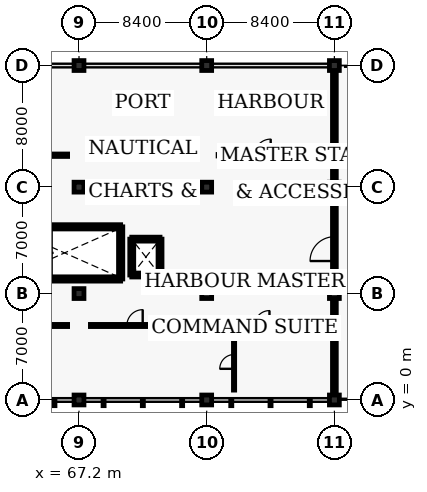
"""IFC4 building model, lengths in metres.
Left out: names, types, materials, properties, quantities, classifications, styles, units other than length and angle.
Written with IfcOpenShell. Run it as: python <this file> out.ifc"""

import sys

from ifc_helpers import new_model, si_unit, direction, frame, frame_2d, origin, origin_2d, place, context, subcontext, project, spatial, rectangle, extrude, element, fill, save


model = new_model("IFC4")
c1 = context("Model", 3, precision=1e-05, world=origin(), true_north=direction((0.0, 1.0)))
c2 = subcontext(c1, "Body", "Model", "MODEL_VIEW")
j1 = project(units=[si_unit("LENGTHUNIT", "METRE"), si_unit("PLANEANGLEUNIT", "RADIAN")], contexts=[c1])
p1 = place(None, origin())
s1 = spatial("IfcSite", under=j1, at=p1, CompositionType="ELEMENT")
p2 = place(p1, origin())
s2 = spatial("IfcBuilding", under=s1, at=p2, CompositionType="ELEMENT")
p3 = place(p2, frame((0.0, 0.0, 13.12)))
s3 = spatial("IfcBuildingStorey", under=s2, at=p3, CompositionType="ELEMENT", Elevation=13.12)
for number, where, z_axis, x_axis in (
    (1, (67.2, 0.0, 0.0), (0.0, 0.0, 1.0), (1.0, 0.0, 0.0)),
    (2, (67.2, 7.0, 0.0), (0.0, 0.0, 1.0), (1.0, 0.0, 0.0)),
    (3, (67.2, 14.0, 0.0), (0.0, 0.0, 1.0), (1.0, 0.0, 0.0)),
    (4, (67.2, 22.0, 0.0), (0.0, 0.0, 1.0), (1.0, 0.0, 0.0)),
    (5, (75.6, 0.0, 0.0), (0.0, 0.0, 1.0), (1.0, 0.0, 0.0)),
    (6, (75.6, 7.0, 0.0), (0.0, 0.0, 1.0), (1.0, 0.0, 0.0)),
    (7, (75.6, 14.0, 0.0), (0.0, 0.0, 1.0), (1.0, 0.0, 0.0)),
    (8, (75.6, 22.0, 0.0), (0.0, 0.0, 1.0), (1.0, 0.0, 0.0)),
    (9, (84.0, 0.0, 0.0), (0.0, 0.0, 1.0), (1.0, 0.0, 0.0)),
    (10, (84.0, 7.0, 0.0), (0.0, 0.0, 1.0), (1.0, 0.0, 0.0)),
    (11, (84.0, 14.0, 0.0), (0.0, 0.0, 1.0), (1.0, 0.0, 0.0)),
    (12, (84.0, 22.0, 0.0), (0.0, 0.0, 1.0), (1.0, 0.0, 0.0)),
):
    element("IfcColumn", number, at=place(p3, frame(where, z_axis=z_axis, x_axis=x_axis)), inside=s3, PredefinedType="COLUMN", context=c2, shape_type="SweptSolid", body=[
        extrude(rectangle(XDim=0.65, YDim=0.65, at=origin_2d()), origin(), (0.0, 0.0, 1.0), 3.2),
    ])
p4 = place(p3, frame((84.0, 0.325, 0.0), z_axis=(0.0, 0.0, 1.0), x_axis=(0.0, 1.0, 0.0)))
e13 = element("IfcWall", 13, at=p4, inside=s3, PredefinedType="SOLIDWALL", context=c2, shape_type="SweptSolid", body=[
    extrude(rectangle(XDim=6.35, YDim=0.25, at=frame_2d((3.175, 0.0))), origin(), (0.0, 0.0, 1.0), 2.275),
])
p5 = place(p3, frame((84.0, 7.325, 0.0), z_axis=(0.0, 0.0, 1.0), x_axis=(0.0, 1.0, 0.0)))
e14 = element("IfcWall", 14, at=p5, inside=s3, PredefinedType="SOLIDWALL", context=c2, shape_type="SweptSolid", body=[
    extrude(rectangle(XDim=6.35, YDim=0.25, at=frame_2d((3.175, 0.0))), origin(), (0.0, 0.0, 1.0), 2.275),
])
p6 = place(p5, frame((1.815, 0.0, 0.0)))
e15 = element("IfcOpeningElement", 15, at=p6, cuts=e14, PredefinedType="OPENING", context=c2, shape_type="SweptSolid", body=[
    extrude(rectangle(XDim=1.6, YDim=2.1, at=frame_2d((0.8, 1.05))), frame((0.0, 0.135, 0.0), z_axis=(0.0, -1.0, 0.0), x_axis=(1.0, 0.0, 0.0)), (0.0, 0.0, 1.0), 0.27),
])
p7 = place(p3, frame((84.0, 14.325, 0.0), z_axis=(0.0, 0.0, 1.0), x_axis=(0.0, 1.0, 0.0)))
e16 = element("IfcWall", 16, at=p7, inside=s3, PredefinedType="SOLIDWALL", context=c2, shape_type="SweptSolid", body=[
    extrude(rectangle(XDim=7.35, YDim=0.25, at=frame_2d((3.675, 0.0))), origin(), (0.0, 0.0, 1.0), 2.275),
])
for number, where, z_axis, x_axis in (
    (17, (61.06, 7.96, 0.0), (0.0, 0.0, 1.0), (1.0, 0.0, 0.0)),
    (18, (61.06, 11.39, 0.0), (0.0, 0.0, 1.0), (1.0, 0.0, 0.0)),
):
    element("IfcWall", number, at=place(p3, frame(where, z_axis=z_axis, x_axis=x_axis)), inside=s3, PredefinedType="SHEAR", context=c2, shape_type="SweptSolid", body=[
        extrude(rectangle(XDim=8.88, YDim=0.28, at=frame_2d((4.44, 0.0))), origin(), (0.0, 0.0, 1.0), 3.2),
    ])
p8 = place(p3, frame((69.94, 7.96, 0.0), z_axis=(0.0, 0.0, 1.0), x_axis=(0.0, 1.0, 0.0)))
e19 = element("IfcWall", 19, at=p8, inside=s3, PredefinedType="SHEAR", context=c2, shape_type="SweptSolid", body=[
    extrude(rectangle(XDim=3.43, YDim=0.28, at=frame_2d((1.715, 0.0))), origin(), (0.0, 0.0, 1.0), 3.2),
])
p9 = place(p3, frame((70.67, 8.22, 0.0), z_axis=(0.0, 0.0, 1.0), x_axis=(1.0, 0.0, 0.0)))
e20 = element("IfcWall", 20, at=p9, inside=s3, PredefinedType="SHEAR", context=c2, shape_type="SweptSolid", body=[
    extrude(rectangle(XDim=1.86, YDim=0.26, at=frame_2d((0.93, 0.0))), origin(), (0.0, 0.0, 1.0), 3.2),
])
for number, where, z_axis, x_axis in (
    (21, (72.53, 8.22, 0.0), (0.0, 0.0, 1.0), (0.0, 1.0, 0.0)),
    (22, (70.67, 10.58, 0.0), (0.0, 0.0, 1.0), (0.0, -1.0, 0.0)),
):
    element("IfcWall", number, at=place(p3, frame(where, z_axis=z_axis, x_axis=x_axis)), inside=s3, PredefinedType="SHEAR", context=c2, shape_type="SweptSolid", body=[
        extrude(rectangle(XDim=2.36, YDim=0.26, at=frame_2d((1.18, 0.0))), origin(), (0.0, 0.0, 1.0), 3.2),
    ])
p10 = place(p3, frame((70.67, 10.58, 0.0), z_axis=(0.0, 0.0, 1.0), x_axis=(1.0, 0.0, 0.0)))
e23 = element("IfcWall", 23, at=p10, inside=s3, PredefinedType="SHEAR", context=c2, shape_type="SweptSolid", body=[
    extrude(rectangle(XDim=1.86, YDim=0.26, at=frame_2d((0.93, 0.0))), origin(), (0.0, 0.0, 1.0), 3.2),
])
p11 = place(p10, frame((0.36, 0.0, 0.0)))
e24 = element("IfcOpeningElement", 24, at=p11, cuts=e23, PredefinedType="OPENING", context=c2, shape_type="SweptSolid", body=[
    extrude(rectangle(XDim=1.14, YDim=2.14, at=frame_2d((0.57, 1.07))), frame((0.0, 0.14, 0.0), z_axis=(0.0, -1.0, 0.0), x_axis=(1.0, 0.0, 0.0)), (0.0, 0.0, 1.0), 0.28),
])
p12 = place(p3, frame((59.55, 4.9, 0.0), z_axis=(0.0, 0.0, 1.0), x_axis=(1.0, 0.0, 0.0)))
e25 = element("IfcWall", 25, at=p12, inside=s3, PredefinedType="PARTITIONING", context=c2, shape_type="SweptSolid", body=[
    extrude(rectangle(XDim=6.9, YDim=0.14, at=frame_2d((3.45, 0.0))), origin(), (0.0, 0.0, 1.0), 2.475),
])
p13 = place(p12, frame((2.4, 0.0, 0.0)))
e26 = element("IfcOpeningElement", 26, at=p13, cuts=e25, PredefinedType="OPENING", context=c2, shape_type="SweptSolid", body=[
    extrude(rectangle(XDim=0.98, YDim=2.12, at=frame_2d((0.49, 1.06))), frame((0.0, 0.08, 0.0), z_axis=(0.0, -1.0, 0.0), x_axis=(1.0, 0.0, 0.0)), (0.0, 0.0, 1.0), 0.16),
])
p14 = place(p3, frame((59.55, 16.1, 0.0), z_axis=(0.0, 0.0, 1.0), x_axis=(1.0, 0.0, 0.0)))
e27 = element("IfcWall", 27, at=p14, inside=s3, PredefinedType="PARTITIONING", context=c2, shape_type="SweptSolid", body=[
    extrude(rectangle(XDim=6.9, YDim=0.16, at=frame_2d((3.45, 0.0))), origin(), (0.0, 0.0, 1.0), 2.475),
])
p15 = place(p14, frame((2.4, 0.0, 0.0)))
e28 = element("IfcOpeningElement", 28, at=p15, cuts=e27, PredefinedType="OPENING", context=c2, shape_type="SweptSolid", body=[
    extrude(rectangle(XDim=1.04, YDim=2.14, at=frame_2d((0.52, 1.07))), frame((0.0, 0.09, 0.0), z_axis=(0.0, -1.0, 0.0), x_axis=(1.0, 0.0, 0.0)), (0.0, 0.0, 1.0), 0.18),
])
p16 = place(p3, frame((67.95, 4.9, 0.0), z_axis=(0.0, 0.0, 1.0), x_axis=(1.0, 0.0, 0.0)))
e29 = element("IfcWall", 29, at=p16, inside=s3, PredefinedType="PARTITIONING", context=c2, shape_type="SweptSolid", body=[
    extrude(rectangle(XDim=6.9, YDim=0.14, at=frame_2d((3.45, 0.0))), origin(), (0.0, 0.0, 1.0), 2.475),
])
p17 = place(p16, frame((2.4, 0.0, 0.0)))
e30 = element("IfcOpeningElement", 30, at=p17, cuts=e29, PredefinedType="OPENING", context=c2, shape_type="SweptSolid", body=[
    extrude(rectangle(XDim=1.04, YDim=2.14, at=frame_2d((0.52, 1.07))), frame((0.0, 0.08, 0.0), z_axis=(0.0, -1.0, 0.0), x_axis=(1.0, 0.0, 0.0)), (0.0, 0.0, 1.0), 0.16),
])
p18 = place(p3, frame((67.95, 16.1, 0.0), z_axis=(0.0, 0.0, 1.0), x_axis=(1.0, 0.0, 0.0)))
e31 = element("IfcWall", 31, at=p18, inside=s3, PredefinedType="PARTITIONING", context=c2, shape_type="SweptSolid", body=[
    extrude(rectangle(XDim=6.9, YDim=0.16, at=frame_2d((3.45, 0.0))), origin(), (0.0, 0.0, 1.0), 2.475),
])
p19 = place(p18, frame((2.4, 0.0, 0.0)))
e32 = element("IfcOpeningElement", 32, at=p19, cuts=e31, PredefinedType="OPENING", context=c2, shape_type="SweptSolid", body=[
    extrude(rectangle(XDim=1.04, YDim=2.14, at=frame_2d((0.52, 1.07))), frame((0.0, 0.09, 0.0), z_axis=(0.0, -1.0, 0.0), x_axis=(1.0, 0.0, 0.0)), (0.0, 0.0, 1.0), 0.18),
])
p20 = place(p3, frame((76.35, 4.9, 0.0), z_axis=(0.0, 0.0, 1.0), x_axis=(1.0, 0.0, 0.0)))
e33 = element("IfcWall", 33, at=p20, inside=s3, PredefinedType="PARTITIONING", context=c2, shape_type="SweptSolid", body=[
    extrude(rectangle(XDim=6.9, YDim=0.14, at=frame_2d((3.45, 0.0))), origin(), (0.0, 0.0, 1.0), 2.475),
])
p21 = place(p20, frame((2.4, 0.0, 0.0)))
e34 = element("IfcOpeningElement", 34, at=p21, cuts=e33, PredefinedType="OPENING", context=c2, shape_type="SweptSolid", body=[
    extrude(rectangle(XDim=0.98, YDim=2.12, at=frame_2d((0.49, 1.06))), frame((0.0, 0.08, 0.0), z_axis=(0.0, -1.0, 0.0), x_axis=(1.0, 0.0, 0.0)), (0.0, 0.0, 1.0), 0.16),
])
p22 = place(p3, frame((77.4, 0.65, 0.0), z_axis=(0.0, 0.0, 1.0), x_axis=(0.0, 1.0, 0.0)))
e35 = element("IfcWall", 35, at=p22, inside=s3, PredefinedType="PARTITIONING", context=c2, shape_type="SweptSolid", body=[
    extrude(rectangle(XDim=4.1, YDim=0.08, at=frame_2d((2.05, 0.0))), origin(), (0.0, 0.0, 1.0), 2.5),
])
p23 = place(p22, frame((1.4, 0.0, 0.0)))
e36 = element("IfcOpeningElement", 36, at=p23, cuts=e35, PredefinedType="OPENING", context=c2, shape_type="SweptSolid", body=[
    extrude(rectangle(XDim=0.94, YDim=2.08, at=frame_2d((0.47, 1.04))), frame((0.0, 0.05, 0.0), z_axis=(0.0, -1.0, 0.0), x_axis=(1.0, 0.0, 0.0)), (0.0, 0.0, 1.0), 0.1),
])
p24 = place(p3, frame((76.35, 16.1, 0.0), z_axis=(0.0, 0.0, 1.0), x_axis=(1.0, 0.0, 0.0)))
e37 = element("IfcWall", 37, at=p24, inside=s3, PredefinedType="PARTITIONING", context=c2, shape_type="SweptSolid", body=[
    extrude(rectangle(XDim=6.9, YDim=0.1, at=frame_2d((3.45, 0.0))), origin(), (0.0, 0.0, 1.0), 2.475),
])
p25 = place(p24, frame((2.4, 0.0, 0.0)))
e38 = element("IfcOpeningElement", 38, at=p25, cuts=e37, PredefinedType="OPENING", context=c2, shape_type="SweptSolid", body=[
    extrude(rectangle(XDim=1.06, YDim=2.1, at=frame_2d((0.53, 1.05))), frame((0.0, 0.06, 0.0), z_axis=(0.0, -1.0, 0.0), x_axis=(1.0, 0.0, 0.0)), (0.0, 0.0, 1.0), 0.12),
])
p26 = place(p6, origin())
e39 = element("IfcDoor", 39, at=p26, inside=s3, OperationType="SINGLE_SWING_LEFT", PredefinedType="DOOR", context=c2, shape_type="SweptSolid", body=[
    extrude(rectangle(XDim=1.6, YDim=2.1, at=frame_2d((0.8, 1.05))), frame((0.0, 0.025, 0.0), z_axis=(0.0, -1.0, 0.0), x_axis=(1.0, 0.0, 0.0)), (0.0, 0.0, 1.0), 0.05),
])
fill(e15, e39)
p27 = place(p11, origin())
e40 = element("IfcDoor", 40, at=p27, inside=s3, OperationType="DOUBLE_DOOR_SLIDING", PredefinedType="DOOR", context=c2, shape_type="SweptSolid", body=[
    extrude(rectangle(XDim=1.14, YDim=2.14, at=frame_2d((0.57, 1.07))), frame((0.0, 0.025, 0.0), z_axis=(0.0, -1.0, 0.0), x_axis=(1.0, 0.0, 0.0)), (0.0, 0.0, 1.0), 0.05),
])
fill(e24, e40)
p28 = place(p17, origin())
e41 = element("IfcDoor", 41, at=p28, inside=s3, OperationType="SINGLE_SWING_RIGHT", PredefinedType="DOOR", context=c2, shape_type="SweptSolid", body=[
    extrude(rectangle(XDim=1.04, YDim=2.14, at=frame_2d((0.52, 1.07))), frame((0.0, 0.025, 0.0), z_axis=(0.0, -1.0, 0.0), x_axis=(1.0, 0.0, 0.0)), (0.0, 0.0, 1.0), 0.05),
])
fill(e30, e41)
p29 = place(p19, origin())
e42 = element("IfcDoor", 42, at=p29, inside=s3, OperationType="SINGLE_SWING_LEFT", PredefinedType="DOOR", context=c2, shape_type="SweptSolid", body=[
    extrude(rectangle(XDim=1.04, YDim=2.14, at=frame_2d((0.52, 1.07))), frame((0.0, 0.025, 0.0), z_axis=(0.0, -1.0, 0.0), x_axis=(1.0, 0.0, 0.0)), (0.0, 0.0, 1.0), 0.05),
])
fill(e32, e42)
p30 = place(p21, origin())
e43 = element("IfcDoor", 43, at=p30, inside=s3, OperationType="SINGLE_SWING_RIGHT", PredefinedType="DOOR", context=c2, shape_type="SweptSolid", body=[
    extrude(rectangle(XDim=0.98, YDim=2.12, at=frame_2d((0.49, 1.06))), frame((0.0, 0.025, 0.0), z_axis=(0.0, -1.0, 0.0), x_axis=(1.0, 0.0, 0.0)), (0.0, 0.0, 1.0), 0.05),
])
fill(e34, e43)
p31 = place(p23, origin())
e44 = element("IfcDoor", 44, at=p31, inside=s3, OperationType="SINGLE_SWING_LEFT", PredefinedType="DOOR", context=c2, shape_type="SweptSolid", body=[
    extrude(rectangle(XDim=0.94, YDim=2.08, at=frame_2d((0.47, 1.04))), frame((0.0, 0.025, 0.0), z_axis=(0.0, -1.0, 0.0), x_axis=(1.0, 0.0, 0.0)), (0.0, 0.0, 1.0), 0.05),
])
fill(e36, e44)
p32 = place(p25, origin())
e45 = element("IfcDoor", 45, at=p32, inside=s3, OperationType="SINGLE_SWING_RIGHT", PredefinedType="DOOR", context=c2, shape_type="SweptSolid", body=[
    extrude(rectangle(XDim=1.06, YDim=2.1, at=frame_2d((0.53, 1.05))), frame((0.0, 0.025, 0.0), z_axis=(0.0, -1.0, 0.0), x_axis=(1.0, 0.0, 0.0)), (0.0, 0.0, 1.0), 0.05),
])
fill(e38, e45)
save(model, sys.argv[1])
